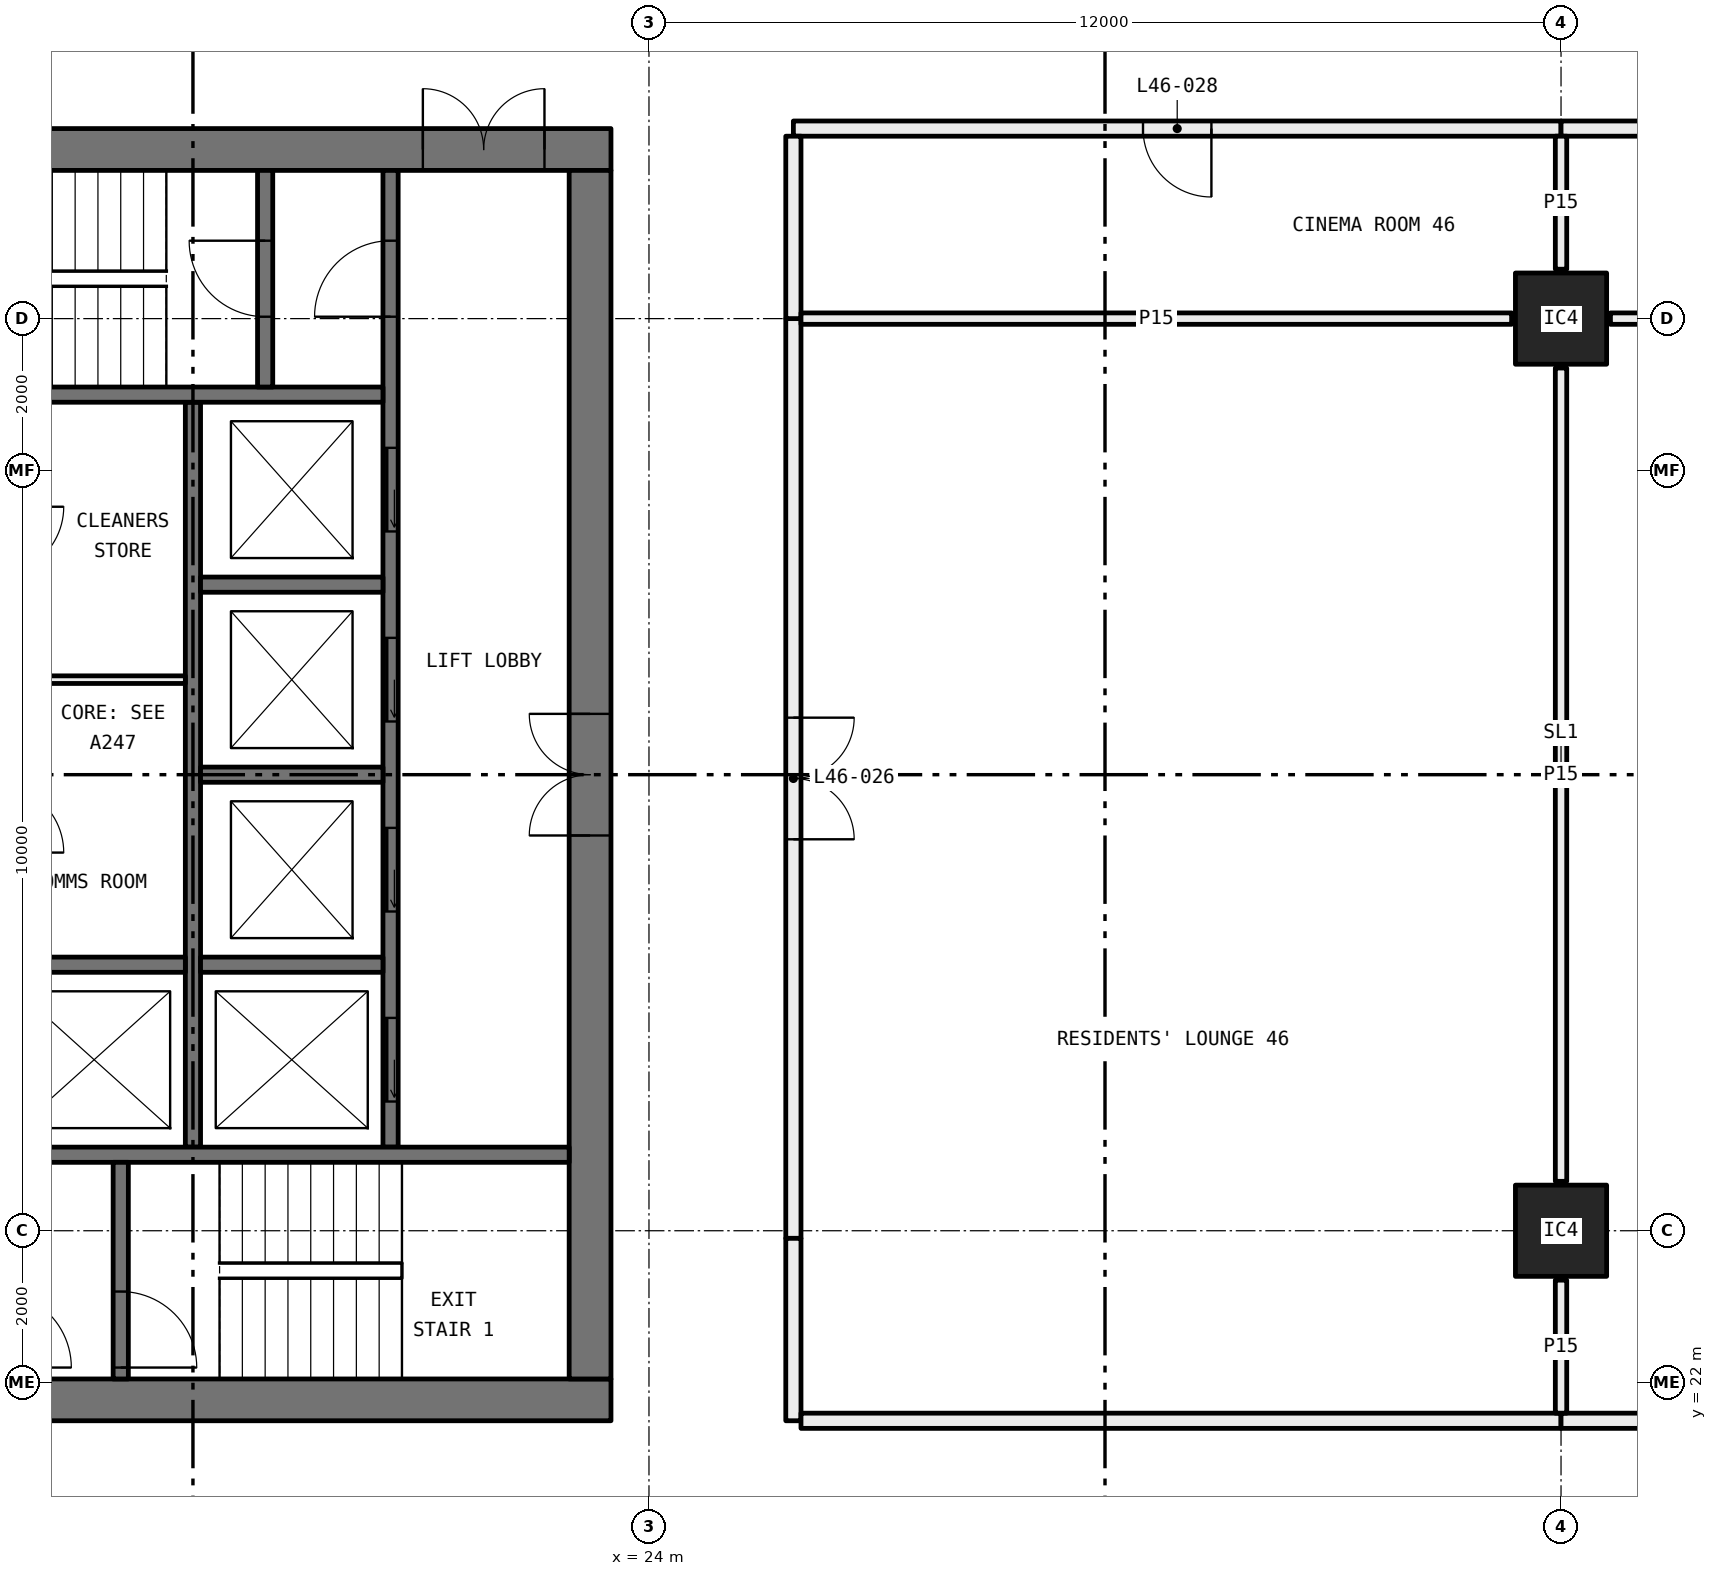
"""IFC4 building model, lengths in metres.
Left out: names, types, materials, properties, quantities, classifications, styles, units other than length and angle.
Written with IfcOpenShell. Run it as: python <this file> out.ifc"""

import sys

from ifc_helpers import new_model, si_unit, direction, frame, frame_2d, origin, origin_2d, place, context, subcontext, project, spatial, rectangle, hollow_rectangle, extrude, element, fill, save


model = new_model("IFC4")
c1 = context("Model", 3, precision=1e-05, world=origin(), true_north=direction((0.0, 1.0)))
c2 = subcontext(c1, "Body", "Model", "MODEL_VIEW")
j1 = project(units=[si_unit("LENGTHUNIT", "METRE"), si_unit("PLANEANGLEUNIT", "RADIAN")], contexts=[c1])
p1 = place(None, origin())
s1 = spatial("IfcSite", under=j1, at=p1, CompositionType="ELEMENT")
p2 = place(p1, origin())
s2 = spatial("IfcBuilding", under=s1, at=p2, CompositionType="ELEMENT")
p3 = place(p2, frame((0.0, 0.0, 175.5)))
s3 = spatial("IfcBuildingStorey", under=s2, at=p3, CompositionType="ELEMENT", Elevation=175.5)
for number, where, z_axis, x_axis in (
    (1, (36.0, 24.0, 0.0), (0.0, 0.0, 1.0), (1.0, 0.0, 0.0)),
    (2, (36.0, 36.0, 0.0), (0.0, 0.0, 1.0), (1.0, 0.0, 0.0)),
):
    element("IfcColumn", number, at=place(p3, frame(where, z_axis=z_axis, x_axis=x_axis)), inside=s3, PredefinedType="COLUMN", context=c2, shape_type="SweptSolid", body=[
        extrude(hollow_rectangle(XDim=1.2, YDim=1.2, WallThickness=0.05, at=origin_2d()), origin(), (0.0, 0.0, 1.0), 3.05),
    ])
p4 = place(p3, frame((25.9, 36.0, 0.0), z_axis=(0.0, 0.0, 1.0), x_axis=(0.0, -1.0, 0.0)))
e3 = element("IfcWall", 3, at=p4, inside=s3, PredefinedType="PARTITIONING", context=c2, shape_type="SweptSolid", body=[
    extrude(rectangle(XDim=12.1, YDim=0.2, at=frame_2d((6.05, 0.0))), origin(), (0.0, 0.0, 1.0), 2.45),
])
p5 = place(p4, frame((5.25, 0.0, 0.0)))
e4 = element("IfcOpeningElement", 4, at=p5, cuts=e3, PredefinedType="OPENING", context=c2, shape_type="SweptSolid", body=[
    extrude(rectangle(XDim=1.6, YDim=2.1, at=frame_2d((0.8, 1.05))), frame((0.0, 0.11, 0.0), z_axis=(0.0, -1.0, 0.0), x_axis=(1.0, 0.0, 0.0)), (0.0, 0.0, 1.0), 0.22),
])
p6 = place(p3, frame((25.9, 23.9, 0.0), z_axis=(0.0, 0.0, 1.0), x_axis=(0.0, -1.0, 0.0)))
e5 = element("IfcWall", 5, at=p6, inside=s3, PredefinedType="PARTITIONING", context=c2, shape_type="SweptSolid", body=[
    extrude(rectangle(XDim=2.4, YDim=0.2, at=frame_2d((1.2, 0.0))), origin(), (0.0, 0.0, 1.0), 3.05),
])
p7 = place(p3, frame((26.0, 21.5, 0.0), z_axis=(0.0, 0.0, 1.0), x_axis=(1.0, 0.0, 0.0)))
e6 = element("IfcWall", 6, at=p7, inside=s3, PredefinedType="PARTITIONING", context=c2, shape_type="SweptSolid", body=[
    extrude(rectangle(XDim=10.0, YDim=0.2, at=frame_2d((5.0, 0.0))), origin(), (0.0, 0.0, 1.0), 2.45),
])
p8 = place(p3, frame((36.0, 21.5, 0.0), z_axis=(0.0, 0.0, 1.0), x_axis=(1.0, 0.0, 0.0)))
e7 = element("IfcWall", 7, at=p8, inside=s3, PredefinedType="PARTITIONING", context=c2, shape_type="SweptSolid", body=[
    extrude(rectangle(XDim=10.1, YDim=0.2, at=frame_2d((5.05, 0.0))), origin(), (0.0, 0.0, 1.0), 2.45),
])
p9 = place(p3, frame((36.0, 38.5, 0.0), z_axis=(0.0, 0.0, 1.0), x_axis=(-1.0, 0.0, 0.0)))
e8 = element("IfcWall", 8, at=p9, inside=s3, PredefinedType="PARTITIONING", context=c2, shape_type="SweptSolid", body=[
    extrude(rectangle(XDim=10.1, YDim=0.2, at=frame_2d((5.05, 0.0))), origin(), (0.0, 0.0, 1.0), 2.45),
])
p10 = place(p9, frame((4.6, 0.0, 0.0)))
e9 = element("IfcOpeningElement", 9, at=p10, cuts=e8, PredefinedType="OPENING", context=c2, shape_type="SweptSolid", body=[
    extrude(rectangle(XDim=0.9, YDim=2.1, at=frame_2d((0.45, 1.05))), frame((0.0, 0.11, 0.0), z_axis=(0.0, -1.0, 0.0), x_axis=(1.0, 0.0, 0.0)), (0.0, 0.0, 1.0), 0.22),
])
p11 = place(p3, frame((25.9, 38.4, 0.0), z_axis=(0.0, 0.0, 1.0), x_axis=(0.0, -1.0, 0.0)))
e10 = element("IfcWall", 10, at=p11, inside=s3, PredefinedType="PARTITIONING", context=c2, shape_type="SweptSolid", body=[
    extrude(rectangle(XDim=2.4, YDim=0.2, at=frame_2d((1.2, 0.0))), origin(), (0.0, 0.0, 1.0), 2.45),
])
p12 = place(p3, frame((46.0, 38.5, 0.0), z_axis=(0.0, 0.0, 1.0), x_axis=(-1.0, 0.0, 0.0)))
e11 = element("IfcWall", 11, at=p12, inside=s3, PredefinedType="PARTITIONING", context=c2, shape_type="SweptSolid", body=[
    extrude(rectangle(XDim=10.0, YDim=0.2, at=frame_2d((5.0, 0.0))), origin(), (0.0, 0.0, 1.0), 2.45),
])
p13 = place(p12, frame((4.55, 0.0, 0.0)))
e12 = element("IfcOpeningElement", 12, at=p13, cuts=e11, PredefinedType="OPENING", context=c2, shape_type="SweptSolid", body=[
    extrude(rectangle(XDim=0.9, YDim=2.1, at=frame_2d((0.45, 1.05))), frame((0.0, 0.11, 0.0), z_axis=(0.0, -1.0, 0.0), x_axis=(1.0, 0.0, 0.0)), (0.0, 0.0, 1.0), 0.22),
])
p14 = place(p3, frame((36.0, 21.6, 0.0), z_axis=(0.0, 0.0, 1.0), x_axis=(0.0, 1.0, 0.0)))
e13 = element("IfcWall", 13, at=p14, inside=s3, PredefinedType="PARTITIONING", context=c2, shape_type="SweptSolid", body=[
    extrude(rectangle(XDim=1.75, YDim=0.15, at=frame_2d((0.875, 0.0))), origin(), (0.0, 0.0, 1.0), 2.45),
])
p15 = place(p3, frame((36.0, 24.65, 0.0), z_axis=(0.0, 0.0, 1.0), x_axis=(0.0, 1.0, 0.0)))
e14 = element("IfcWall", 14, at=p15, inside=s3, PredefinedType="PARTITIONING", context=c2, shape_type="SweptSolid", body=[
    extrude(rectangle(XDim=10.7, YDim=0.15, at=frame_2d((5.35, 0.0))), origin(), (0.0, 0.0, 1.0), 2.45),
])
for number, where, z_axis, x_axis in (
    (15, (35.35, 36.0, 0.0), (0.0, 0.0, 1.0), (-1.0, 0.0, 0.0)),
    (16, (46.0, 36.0, 0.0), (0.0, 0.0, 1.0), (-1.0, 0.0, 0.0)),
):
    element("IfcWall", number, at=place(p3, frame(where, z_axis=z_axis, x_axis=x_axis)), inside=s3, PredefinedType="PARTITIONING", context=c2, shape_type="SweptSolid", body=[
        extrude(rectangle(XDim=9.35, YDim=0.15, at=frame_2d((4.675, 0.0))), origin(), (0.0, 0.0, 1.0), 2.45),
    ])
p16 = place(p3, frame((36.0, 36.65, 0.0), z_axis=(0.0, 0.0, 1.0), x_axis=(0.0, 1.0, 0.0)))
e17 = element("IfcWall", 17, at=p16, inside=s3, PredefinedType="PARTITIONING", context=c2, shape_type="SweptSolid", body=[
    extrude(rectangle(XDim=1.75, YDim=0.15, at=frame_2d((0.875, 0.0))), origin(), (0.0, 0.0, 1.0), 2.45),
])
p17 = place(p3, frame((12.5, 21.775, 0.0), z_axis=(0.0, 0.0, 1.0), x_axis=(1.0, 0.0, 0.0)))
e18 = element("IfcWall", 18, at=p17, inside=s3, PredefinedType="SHEAR", context=c2, shape_type="SweptSolid", body=[
    extrude(rectangle(XDim=11.0, YDim=0.55, at=frame_2d((5.5, 0.0))), origin(), (0.0, 0.0, 1.0), 3.05),
])
p18 = place(p3, frame((12.5, 38.225, 0.0), z_axis=(0.0, 0.0, 1.0), x_axis=(1.0, 0.0, 0.0)))
e19 = element("IfcWall", 19, at=p18, inside=s3, PredefinedType="SHEAR", context=c2, shape_type="SweptSolid", body=[
    extrude(rectangle(XDim=11.0, YDim=0.55, at=frame_2d((5.5, 0.0))), origin(), (0.0, 0.0, 1.0), 3.05),
])
p19 = place(p18, frame((8.525, 0.0, 0.0)))
e20 = element("IfcOpeningElement", 20, at=p19, cuts=e19, PredefinedType="OPENING", context=c2, shape_type="SweptSolid", body=[
    extrude(rectangle(XDim=1.6, YDim=2.1, at=frame_2d((0.8, 1.05))), frame((0.0, 0.285, 0.0), z_axis=(0.0, -1.0, 0.0), x_axis=(1.0, 0.0, 0.0)), (0.0, 0.0, 1.0), 0.57),
])
p20 = place(p3, frame((23.225, 22.05, 0.0), z_axis=(0.0, 0.0, 1.0), x_axis=(0.0, 1.0, 0.0)))
e21 = element("IfcWall", 21, at=p20, inside=s3, PredefinedType="SHEAR", context=c2, shape_type="SweptSolid", body=[
    extrude(rectangle(XDim=15.9, YDim=0.55, at=frame_2d((7.95, 0.0))), origin(), (0.0, 0.0, 1.0), 3.05),
])
p21 = place(p20, frame((7.15, 0.0, 0.0)))
e22 = element("IfcOpeningElement", 22, at=p21, cuts=e21, PredefinedType="OPENING", context=c2, shape_type="SweptSolid", body=[
    extrude(rectangle(XDim=1.6, YDim=2.1, at=frame_2d((0.8, 1.05))), frame((0.0, 0.285, 0.0), z_axis=(0.0, -1.0, 0.0), x_axis=(1.0, 0.0, 0.0)), (0.0, 0.0, 1.0), 0.57),
])
p22 = place(p3, frame((20.6, 25.1, 0.0), z_axis=(0.0, 0.0, 1.0), x_axis=(0.0, 1.0, 0.0)))
e23 = element("IfcWall", 23, at=p22, inside=s3, PredefinedType="SOLIDWALL", context=c2, shape_type="SweptSolid", body=[
    extrude(rectangle(XDim=12.85, YDim=0.2, at=frame_2d((6.425, 0.0))), origin(), (0.0, 0.0, 1.0), 3.05),
])
p23 = place(p22, frame((0.6, 0.0, 0.0)))
e24 = element("IfcOpeningElement", 24, at=p23, cuts=e23, PredefinedType="OPENING", context=c2, shape_type="SweptSolid", body=[
    extrude(rectangle(XDim=1.1, YDim=2.1, at=frame_2d((0.55, 1.05))), frame((0.0, 0.11, 0.0), z_axis=(0.0, -1.0, 0.0), x_axis=(1.0, 0.0, 0.0)), (0.0, 0.0, 1.0), 0.22),
])
p24 = place(p22, frame((3.1, 0.0, 0.0)))
e25 = element("IfcOpeningElement", 25, at=p24, cuts=e23, PredefinedType="OPENING", context=c2, shape_type="SweptSolid", body=[
    extrude(rectangle(XDim=1.1, YDim=2.1, at=frame_2d((0.55, 1.05))), frame((0.0, 0.11, 0.0), z_axis=(0.0, -1.0, 0.0), x_axis=(1.0, 0.0, 0.0)), (0.0, 0.0, 1.0), 0.22),
])
p25 = place(p22, frame((5.6, 0.0, 0.0)))
e26 = element("IfcOpeningElement", 26, at=p25, cuts=e23, PredefinedType="OPENING", context=c2, shape_type="SweptSolid", body=[
    extrude(rectangle(XDim=1.1, YDim=2.1, at=frame_2d((0.55, 1.05))), frame((0.0, 0.11, 0.0), z_axis=(0.0, -1.0, 0.0), x_axis=(1.0, 0.0, 0.0)), (0.0, 0.0, 1.0), 0.22),
])
p26 = place(p22, frame((8.1, 0.0, 0.0)))
e27 = element("IfcOpeningElement", 27, at=p26, cuts=e23, PredefinedType="OPENING", context=c2, shape_type="SweptSolid", body=[
    extrude(rectangle(XDim=1.1, YDim=2.1, at=frame_2d((0.55, 1.05))), frame((0.0, 0.11, 0.0), z_axis=(0.0, -1.0, 0.0), x_axis=(1.0, 0.0, 0.0)), (0.0, 0.0, 1.0), 0.22),
])
p27 = place(p22, frame((10.925, 0.0, 0.0)))
e28 = element("IfcOpeningElement", 28, at=p27, cuts=e23, PredefinedType="OPENING", context=c2, shape_type="SweptSolid", body=[
    extrude(rectangle(XDim=1.0, YDim=2.1, at=frame_2d((0.5, 1.05))), frame((0.0, 0.11, 0.0), z_axis=(0.0, -1.0, 0.0), x_axis=(1.0, 0.0, 0.0)), (0.0, 0.0, 1.0), 0.22),
])
p28 = place(p3, frame((18.0, 25.1, 0.0), z_axis=(0.0, 0.0, 1.0), x_axis=(0.0, 1.0, 0.0)))
e29 = element("IfcWall", 29, at=p28, inside=s3, PredefinedType="SOLIDWALL", context=c2, shape_type="SweptSolid", body=[
    extrude(rectangle(XDim=9.8, YDim=0.2, at=frame_2d((4.9, 0.0))), origin(), (0.0, 0.0, 1.0), 3.05),
])
for number, where, z_axis, x_axis in (
    (30, (15.5, 25.0, 0.0), (0.0, 0.0, 1.0), (1.0, 0.0, 0.0)),
    (31, (13.05, 35.0, 0.0), (0.0, 0.0, 1.0), (1.0, 0.0, 0.0)),
):
    element("IfcWall", number, at=place(p3, frame(where, z_axis=z_axis, x_axis=x_axis)), inside=s3, PredefinedType="SOLIDWALL", context=c2, shape_type="SweptSolid", body=[
        extrude(rectangle(XDim=7.45, YDim=0.2, at=frame_2d((3.725, 0.0))), origin(), (0.0, 0.0, 1.0), 3.05),
    ])
p29 = place(p3, frame((17.05, 22.05, 0.0), z_axis=(0.0, 0.0, 1.0), x_axis=(0.0, 1.0, 0.0)))
e32 = element("IfcWall", 32, at=p29, inside=s3, PredefinedType="SOLIDWALL", context=c2, shape_type="SweptSolid", body=[
    extrude(rectangle(XDim=2.85, YDim=0.2, at=frame_2d((1.425, 0.0))), origin(), (0.0, 0.0, 1.0), 3.05),
])
p30 = place(p29, frame((0.15, 0.0, 0.0)))
e33 = element("IfcOpeningElement", 33, at=p30, cuts=e32, PredefinedType="OPENING", context=c2, shape_type="SweptSolid", body=[
    extrude(rectangle(XDim=1.0, YDim=2.1, at=frame_2d((0.5, 1.05))), frame((0.0, 0.11, 0.0), z_axis=(0.0, -1.0, 0.0), x_axis=(1.0, 0.0, 0.0)), (0.0, 0.0, 1.0), 0.22),
])
p31 = place(p3, frame((18.95, 35.1, 0.0), z_axis=(0.0, 0.0, 1.0), x_axis=(0.0, 1.0, 0.0)))
e34 = element("IfcWall", 34, at=p31, inside=s3, PredefinedType="SOLIDWALL", context=c2, shape_type="SweptSolid", body=[
    extrude(rectangle(XDim=2.85, YDim=0.2, at=frame_2d((1.425, 0.0))), origin(), (0.0, 0.0, 1.0), 3.05),
])
p32 = place(p31, frame((0.925, 0.0, 0.0)))
e35 = element("IfcOpeningElement", 35, at=p32, cuts=e34, PredefinedType="OPENING", context=c2, shape_type="SweptSolid", body=[
    extrude(rectangle(XDim=1.0, YDim=2.1, at=frame_2d((0.5, 1.05))), frame((0.0, 0.11, 0.0), z_axis=(0.0, -1.0, 0.0), x_axis=(1.0, 0.0, 0.0)), (0.0, 0.0, 1.0), 0.22),
])
for number, where, z_axis, x_axis in (
    (36, (15.5, 27.5, 0.0), (0.0, 0.0, 1.0), (1.0, 0.0, 0.0)),
    (37, (18.1, 27.5, 0.0), (0.0, 0.0, 1.0), (1.0, 0.0, 0.0)),
    (38, (18.1, 30.0, 0.0), (0.0, 0.0, 1.0), (1.0, 0.0, 0.0)),
    (39, (18.1, 32.5, 0.0), (0.0, 0.0, 1.0), (1.0, 0.0, 0.0)),
):
    element("IfcWall", number, at=place(p3, frame(where, z_axis=z_axis, x_axis=x_axis)), inside=s3, PredefinedType="SOLIDWALL", context=c2, shape_type="SweptSolid", body=[
        extrude(rectangle(XDim=2.4, YDim=0.2, at=frame_2d((1.2, 0.0))), origin(), (0.0, 0.0, 1.0), 3.05),
    ])
p33 = place(p3, frame((15.5, 31.25, 0.0), z_axis=(0.0, 0.0, 1.0), x_axis=(1.0, 0.0, 0.0)))
e40 = element("IfcWall", 40, at=p33, inside=s3, PredefinedType="PARTITIONING", context=c2, shape_type="SweptSolid", body=[
    extrude(rectangle(XDim=2.4, YDim=0.1, at=frame_2d((1.2, 0.0))), origin(), (0.0, 0.0, 1.0), 3.05),
])
p34 = place(p5, origin())
e41 = element("IfcDoor", 41, at=p34, inside=s3, OperationType="DOUBLE_DOOR_SINGLE_SWING", PredefinedType="DOOR", context=c2, shape_type="SweptSolid", body=[
    extrude(rectangle(XDim=1.6, YDim=2.1, at=frame_2d((0.8, 1.05))), frame((0.0, 0.025, 0.0), z_axis=(0.0, -1.0, 0.0), x_axis=(1.0, 0.0, 0.0)), (0.0, 0.0, 1.0), 0.05),
])
fill(e4, e41)
p35 = place(p10, origin())
e42 = element("IfcDoor", 42, at=p35, inside=s3, OperationType="SINGLE_SWING_RIGHT", PredefinedType="DOOR", context=c2, shape_type="SweptSolid", body=[
    extrude(rectangle(XDim=0.9, YDim=2.1, at=frame_2d((0.45, 1.05))), frame((0.0, 0.025, 0.0), z_axis=(0.0, -1.0, 0.0), x_axis=(1.0, 0.0, 0.0)), (0.0, 0.0, 1.0), 0.05),
])
fill(e9, e42)
p36 = place(p23, origin())
e43 = element("IfcDoor", 43, at=p36, inside=s3, OperationType="SLIDING_TO_LEFT", PredefinedType="DOOR", context=c2, shape_type="SweptSolid", body=[
    extrude(rectangle(XDim=1.1, YDim=2.1, at=frame_2d((0.55, 1.05))), frame((0.0, 0.025, 0.0), z_axis=(0.0, -1.0, 0.0), x_axis=(1.0, 0.0, 0.0)), (0.0, 0.0, 1.0), 0.05),
])
fill(e24, e43)
p37 = place(p24, origin())
e44 = element("IfcDoor", 44, at=p37, inside=s3, OperationType="SLIDING_TO_LEFT", PredefinedType="DOOR", context=c2, shape_type="SweptSolid", body=[
    extrude(rectangle(XDim=1.1, YDim=2.1, at=frame_2d((0.55, 1.05))), frame((0.0, 0.025, 0.0), z_axis=(0.0, -1.0, 0.0), x_axis=(1.0, 0.0, 0.0)), (0.0, 0.0, 1.0), 0.05),
])
fill(e25, e44)
p38 = place(p25, origin())
e45 = element("IfcDoor", 45, at=p38, inside=s3, OperationType="SLIDING_TO_LEFT", PredefinedType="DOOR", context=c2, shape_type="SweptSolid", body=[
    extrude(rectangle(XDim=1.1, YDim=2.1, at=frame_2d((0.55, 1.05))), frame((0.0, 0.025, 0.0), z_axis=(0.0, -1.0, 0.0), x_axis=(1.0, 0.0, 0.0)), (0.0, 0.0, 1.0), 0.05),
])
fill(e26, e45)
p39 = place(p26, origin())
e46 = element("IfcDoor", 46, at=p39, inside=s3, OperationType="SLIDING_TO_LEFT", PredefinedType="DOOR", context=c2, shape_type="SweptSolid", body=[
    extrude(rectangle(XDim=1.1, YDim=2.1, at=frame_2d((0.55, 1.05))), frame((0.0, 0.025, 0.0), z_axis=(0.0, -1.0, 0.0), x_axis=(1.0, 0.0, 0.0)), (0.0, 0.0, 1.0), 0.05),
])
fill(e27, e46)
p40 = place(p30, frame((1.0, 0.0, 0.0), x_axis=(-1.0, 0.0, 0.0)))
e47 = element("IfcDoor", 47, at=p40, inside=s3, OperationType="SINGLE_SWING_LEFT", PredefinedType="DOOR", context=c2, shape_type="SweptSolid", body=[
    extrude(rectangle(XDim=1.0, YDim=2.1, at=frame_2d((0.5, 1.05))), frame((0.0, 0.025, 0.0), z_axis=(0.0, -1.0, 0.0), x_axis=(1.0, 0.0, 0.0)), (0.0, 0.0, 1.0), 0.05),
])
fill(e33, e47)
p41 = place(p27, origin())
e48 = element("IfcDoor", 48, at=p41, inside=s3, OperationType="SINGLE_SWING_RIGHT", PredefinedType="DOOR", context=c2, shape_type="SweptSolid", body=[
    extrude(rectangle(XDim=1.0, YDim=2.1, at=frame_2d((0.5, 1.05))), frame((0.0, 0.025, 0.0), z_axis=(0.0, -1.0, 0.0), x_axis=(1.0, 0.0, 0.0)), (0.0, 0.0, 1.0), 0.05),
])
fill(e28, e48)
p42 = place(p32, origin())
e49 = element("IfcDoor", 49, at=p42, inside=s3, OperationType="SINGLE_SWING_LEFT", PredefinedType="DOOR", context=c2, shape_type="SweptSolid", body=[
    extrude(rectangle(XDim=1.0, YDim=2.1, at=frame_2d((0.5, 1.05))), frame((0.0, 0.025, 0.0), z_axis=(0.0, -1.0, 0.0), x_axis=(1.0, 0.0, 0.0)), (0.0, 0.0, 1.0), 0.05),
])
fill(e35, e49)
p43 = place(p19, origin())
e50 = element("IfcDoor", 50, at=p43, inside=s3, OperationType="DOUBLE_DOOR_SINGLE_SWING", PredefinedType="DOOR", context=c2, shape_type="SweptSolid", body=[
    extrude(rectangle(XDim=1.6, YDim=2.1, at=frame_2d((0.8, 1.05))), frame((0.0, 0.025, 0.0), z_axis=(0.0, -1.0, 0.0), x_axis=(1.0, 0.0, 0.0)), (0.0, 0.0, 1.0), 0.05),
])
fill(e20, e50)
p44 = place(p21, origin())
e51 = element("IfcDoor", 51, at=p44, inside=s3, OperationType="DOUBLE_DOOR_SINGLE_SWING", PredefinedType="DOOR", context=c2, shape_type="SweptSolid", body=[
    extrude(rectangle(XDim=1.6, YDim=2.1, at=frame_2d((0.8, 1.05))), frame((0.0, 0.025, 0.0), z_axis=(0.0, -1.0, 0.0), x_axis=(1.0, 0.0, 0.0)), (0.0, 0.0, 1.0), 0.05),
])
fill(e22, e51)
save(model, sys.argv[1])
